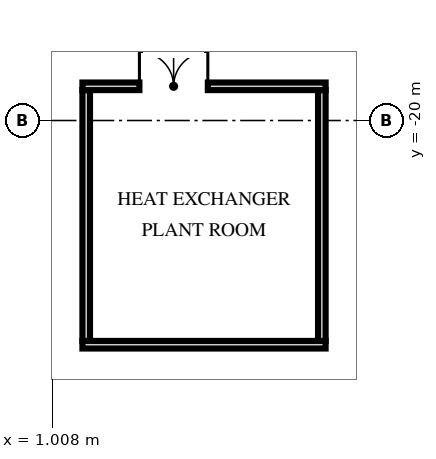
"""IFC4 building model, lengths in metres.
Left out: names, types, materials, properties, quantities, classifications, styles, units other than length and angle.
Written with IfcOpenShell. Run it as: python <this file> out.ifc"""

import sys

from ifc_helpers import new_model, si_unit, direction, frame, frame_2d, origin, origin_2d, place, context, subcontext, project, spatial, rectangle, hollow_rectangle, extrude, element, fill, save


model = new_model("IFC4")
c1 = context("Model", 3, precision=1e-05, world=origin(), true_north=direction((0.0, 1.0)))
c2 = subcontext(c1, "Body", "Model", "MODEL_VIEW")
j1 = project(units=[si_unit("LENGTHUNIT", "METRE"), si_unit("PLANEANGLEUNIT", "RADIAN")], contexts=[c1])
p1 = place(None, origin())
s1 = spatial("IfcSite", under=j1, at=p1, CompositionType="ELEMENT")
p2 = place(p1, origin())
s2 = spatial("IfcBuilding", under=s1, at=p2, CompositionType="ELEMENT")
p3 = place(p2, frame((0.0, 0.0, 99.75)))
s3 = spatial("IfcBuildingStorey", under=s2, at=p3, CompositionType="ELEMENT", Elevation=99.75)
p4 = place(p3, frame((10.0, -29.8, -0.65), z_axis=(-0.103601510687, 0.332963994967, 0.937230870724), x_axis=(0.994618884766, 0.034712905596, 0.097612951251)))
e1 = element("IfcColumn", 1, at=p4, inside=s3, PredefinedType="COLUMN", context=c2, shape_type="SweptSolid", body=[
    extrude(hollow_rectangle(XDim=3.2, YDim=1.8, WallThickness=0.2, at=origin_2d()), origin(), (0.0, 0.0, 1.0), 8.109),
])
p5 = place(p3, frame((0.0, -29.8, -0.65), z_axis=(0.0, 0.334765406017, 0.942301503201), x_axis=(1.0, 0.0, 0.0)))
e2 = element("IfcColumn", 2, at=p5, inside=s3, PredefinedType="COLUMN", context=c2, shape_type="SweptSolid", body=[
    extrude(hollow_rectangle(XDim=3.2, YDim=1.8, WallThickness=0.2, at=origin_2d()), origin(), (0.0, 0.0, 1.0), 8.065),
])
p6 = place(p3, frame((1.8, -25.9, 0.0), z_axis=(0.0, 0.0, 1.0), x_axis=(1.0, 0.0, 0.0)))
e3 = element("IfcWall", 3, at=p6, inside=s3, PredefinedType="SOLIDWALL", context=c2, shape_type="SweptSolid", body=[
    extrude(rectangle(XDim=6.4, YDim=0.2, at=frame_2d((3.2, 0.0))), origin(), (0.0, 0.0, 1.0), 6.46),
])
for number, where, z_axis, x_axis in (
    (4, (1.9, -25.8, 0.0), (0.0, 0.0, 1.0), (0.0, 1.0, 0.0)),
    (5, (8.1, -25.8, 0.0), (0.0, 0.0, 1.0), (0.0, 1.0, 0.0)),
):
    element("IfcWall", number, at=place(p3, frame(where, z_axis=z_axis, x_axis=x_axis)), inside=s3, PredefinedType="SOLIDWALL", context=c2, shape_type="SweptSolid", body=[
        extrude(rectangle(XDim=6.6, YDim=0.2, at=frame_2d((3.3, 0.0))), origin(), (0.0, 0.0, 1.0), 7.25),
    ])
p7 = place(p3, frame((1.8, -19.1, 0.0), z_axis=(0.0, 0.0, 1.0), x_axis=(1.0, 0.0, 0.0)))
e6 = element("IfcWall", 6, at=p7, inside=s3, PredefinedType="SOLIDWALL", context=c2, shape_type="SweptSolid", body=[
    extrude(rectangle(XDim=6.4, YDim=0.2, at=frame_2d((3.2, 0.0))), origin(), (0.0, 0.0, 1.0), 6.46),
])
p8 = place(p7, frame((1.5, 0.0, 0.0)))
e7 = element("IfcOpeningElement", 7, at=p8, cuts=e6, PredefinedType="OPENING", context=c2, shape_type="SweptSolid", body=[
    extrude(rectangle(XDim=1.8, YDim=2.4, at=frame_2d((0.9, 1.2))), frame((0.0, 0.11, 0.0), z_axis=(0.0, -1.0, 0.0), x_axis=(1.0, 0.0, 0.0)), (0.0, 0.0, 1.0), 0.22),
])
p9 = place(p8, origin())
e8 = element("IfcDoor", 8, at=p9, inside=s3, OperationType="DOUBLE_DOOR_SINGLE_SWING", PredefinedType="DOOR", context=c2, shape_type="SweptSolid", body=[
    extrude(rectangle(XDim=1.8, YDim=2.4, at=frame_2d((0.9, 1.2))), frame((0.0, 0.025, 0.0), z_axis=(0.0, -1.0, 0.0), x_axis=(1.0, 0.0, 0.0)), (0.0, 0.0, 1.0), 0.05),
])
fill(e7, e8)
save(model, sys.argv[1])
